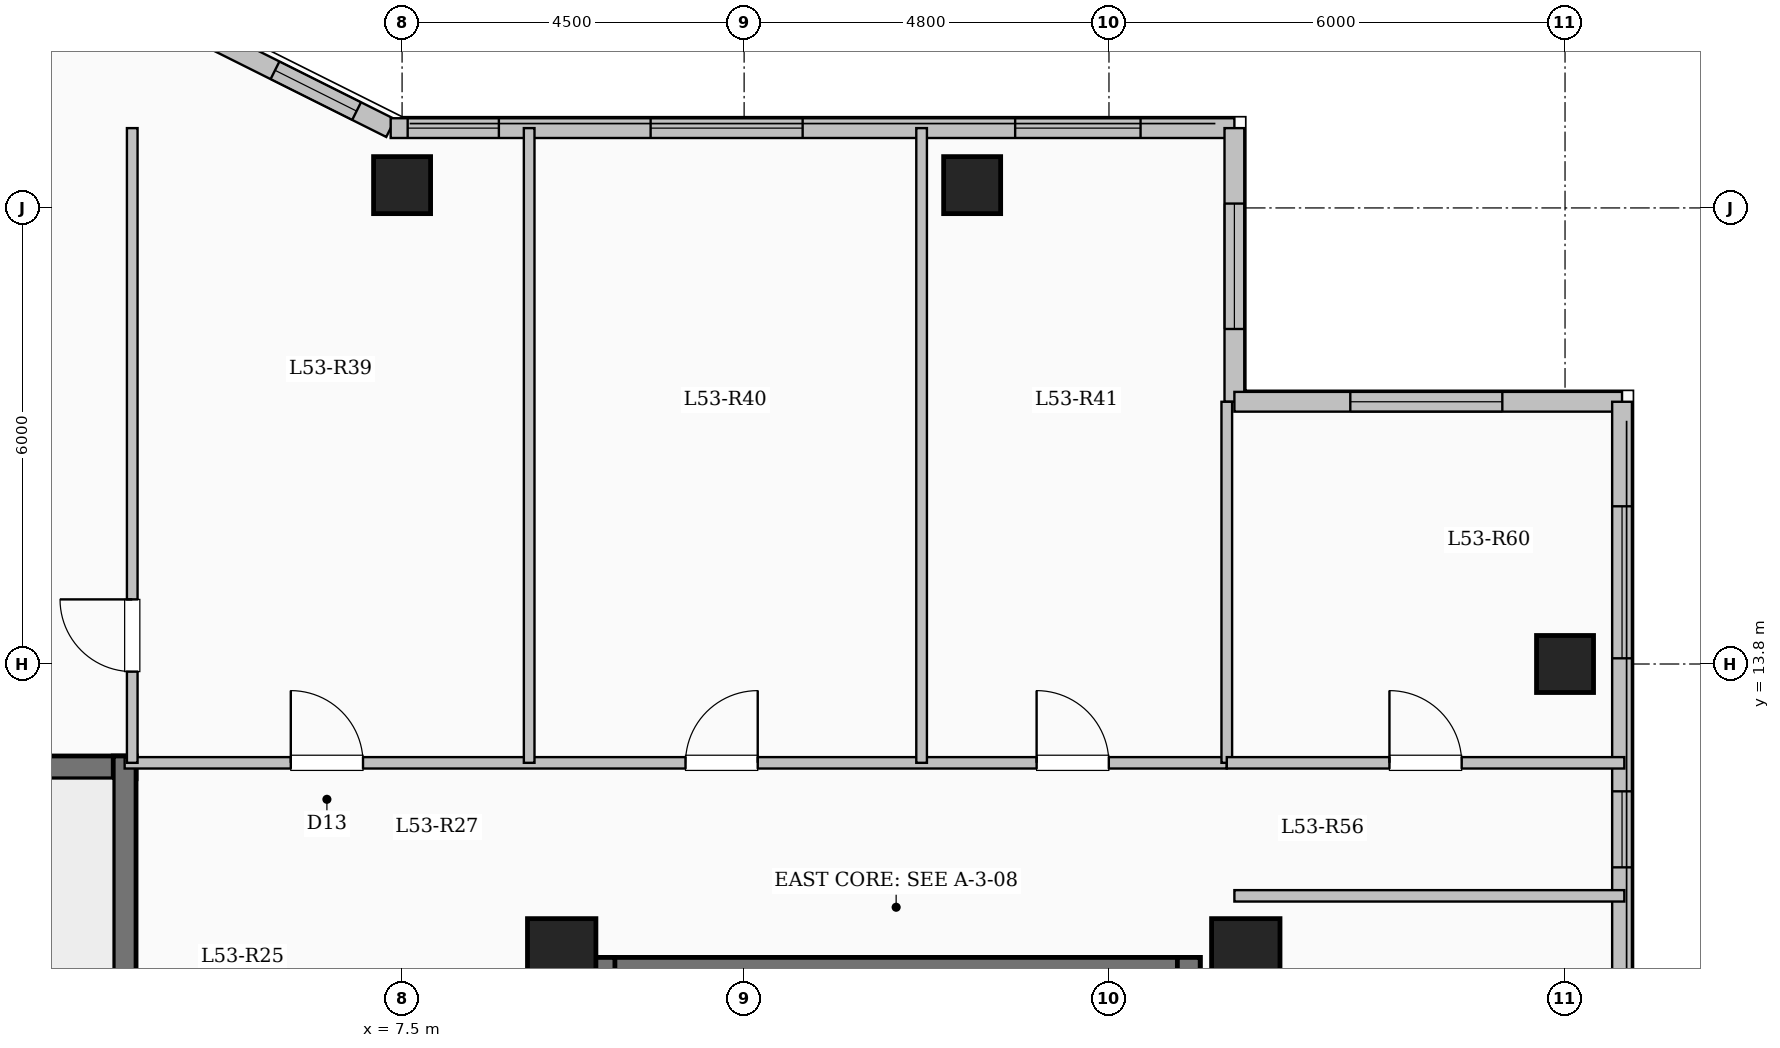
"""IFC4 building model, lengths in metres.
Left out: names, types, materials, properties, quantities, classifications, styles, units other than length and angle.
Written with IfcOpenShell. Run it as: python <this file> out.ifc"""

import sys

from ifc_helpers import new_model, si_unit, direction, frame, frame_2d, origin, origin_2d, place, context, subcontext, project, spatial, rectangle, extrude, element, fill, save


model = new_model("IFC4")
c1 = context("Model", 3, precision=1e-05, world=origin(), true_north=direction((0.0, 1.0)))
c2 = subcontext(c1, "Body", "Model", "MODEL_VIEW")
j1 = project(units=[si_unit("LENGTHUNIT", "METRE"), si_unit("PLANEANGLEUNIT", "RADIAN")], contexts=[c1])
p1 = place(None, origin())
s1 = spatial("IfcSite", under=j1, at=p1, CompositionType="ELEMENT")
p2 = place(p1, origin())
s2 = spatial("IfcBuilding", under=s1, at=p2, CompositionType="ELEMENT")
p3 = place(p2, frame((0.0, 0.0, 196.95)))
s3 = spatial("IfcBuildingStorey", under=s2, at=p3, CompositionType="ELEMENT", Elevation=196.95)
for number, where, z_axis, x_axis in (
    (1, (9.6, 10.0, 0.0), (0.0, 0.0, 1.0), (1.0, 0.0, 0.0)),
    (2, (18.6, 10.0, 0.0), (0.0, 0.0, 1.0), (1.0, 0.0, 0.0)),
):
    element("IfcColumn", number, at=place(p3, frame(where, z_axis=z_axis, x_axis=x_axis)), inside=s3, PredefinedType="COLUMN", context=c2, shape_type="SweptSolid", body=[
        extrude(rectangle(XDim=0.9, YDim=0.9, at=origin_2d()), origin(), (0.0, 0.0, 1.0), 3.35),
    ])
for number, where, z_axis, x_axis in (
    (3, (7.5, 20.1, 0.0), (0.0, 0.0, 1.0), (1.0, 0.0, 0.0)),
    (4, (15.0, 20.1, 0.0), (0.0, 0.0, 1.0), (1.0, 0.0, 0.0)),
    (5, (22.8, 13.8, 0.0), (0.0, 0.0, 1.0), (1.0, 0.0, 0.0)),
):
    element("IfcColumn", number, at=place(p3, frame(where, z_axis=z_axis, x_axis=x_axis)), inside=s3, PredefinedType="COLUMN", context=c2, shape_type="SweptSolid", body=[
        extrude(rectangle(XDim=0.75, YDim=0.75, at=origin_2d()), origin(), (0.0, 0.0, 1.0), 3.35),
    ])
p4 = place(p3, frame((4.35, 22.35, 0.0), z_axis=(0.0, 0.0, 1.0), x_axis=(0.894427191, -0.4472135955, 0.0)))
e6 = element("IfcWall", 6, at=p4, inside=s3, PredefinedType="SOLIDWALL", context=c2, shape_type="SweptSolid", body=[
    extrude(rectangle(XDim=3.354, YDim=0.26, at=frame_2d((1.677, 0.0))), origin(), (0.0, 0.0, 1.0), 3.1),
])
p5 = place(p4, frame((1.653, 0.0, 0.95)))
e7 = element("IfcOpeningElement", 7, at=p5, cuts=e6, PredefinedType="OPENING", context=c2, shape_type="SweptSolid", body=[
    extrude(rectangle(XDim=1.2, YDim=1.5, at=frame_2d((0.6, 0.75))), frame((0.0, 0.14, 0.0), z_axis=(0.0, -1.0, 0.0), x_axis=(1.0, 0.0, 0.0)), (0.0, 0.0, 1.0), 0.28),
])
p6 = place(p3, frame((7.35, 20.85, 0.0), z_axis=(0.0, 0.0, 1.0), x_axis=(1.0, 0.0, 0.0)))
e8 = element("IfcWall", 8, at=p6, inside=s3, PredefinedType="SOLIDWALL", context=c2, shape_type="SweptSolid", body=[
    extrude(rectangle(XDim=11.1, YDim=0.26, at=frame_2d((5.55, 0.0))), origin(), (0.0, 0.0, 1.0), 3.1),
])
p7 = place(p6, frame((0.223, 0.0, 0.95)))
e9 = element("IfcOpeningElement", 9, at=p7, cuts=e8, PredefinedType="OPENING", context=c2, shape_type="SweptSolid", body=[
    extrude(rectangle(XDim=1.2, YDim=1.5, at=frame_2d((0.6, 0.75))), frame((0.0, 0.14, 0.0), z_axis=(0.0, -1.0, 0.0), x_axis=(1.0, 0.0, 0.0)), (0.0, 0.0, 1.0), 0.28),
])
p8 = place(p6, frame((3.42, 0.0, 0.9)))
e10 = element("IfcOpeningElement", 10, at=p8, cuts=e8, PredefinedType="OPENING", context=c2, shape_type="SweptSolid", body=[
    extrude(rectangle(XDim=2.0, YDim=1.7, at=frame_2d((1.0, 0.85))), frame((0.0, 0.14, 0.0), z_axis=(0.0, -1.0, 0.0), x_axis=(1.0, 0.0, 0.0)), (0.0, 0.0, 1.0), 0.28),
])
p9 = place(p6, frame((8.216, 0.0, 0.9)))
e11 = element("IfcOpeningElement", 11, at=p9, cuts=e8, PredefinedType="OPENING", context=c2, shape_type="SweptSolid", body=[
    extrude(rectangle(XDim=1.65, YDim=1.6, at=frame_2d((0.825, 0.8))), frame((0.0, 0.14, 0.0), z_axis=(0.0, -1.0, 0.0), x_axis=(1.0, 0.0, 0.0)), (0.0, 0.0, 1.0), 0.28),
])
p10 = place(p3, frame((18.45, 20.85, 0.0), z_axis=(0.0, 0.0, 1.0), x_axis=(0.0, -1.0, 0.0)))
e12 = element("IfcWall", 12, at=p10, inside=s3, PredefinedType="SOLIDWALL", context=c2, shape_type="SweptSolid", body=[
    extrude(rectangle(XDim=3.6, YDim=0.26, at=frame_2d((1.8, 0.0))), origin(), (0.0, 0.0, 1.0), 3.1),
])
p11 = place(p10, frame((0.992, 0.0, 0.9)))
e13 = element("IfcOpeningElement", 13, at=p11, cuts=e12, PredefinedType="OPENING", context=c2, shape_type="SweptSolid", body=[
    extrude(rectangle(XDim=1.65, YDim=1.6, at=frame_2d((0.825, 0.8))), frame((0.0, 0.14, 0.0), z_axis=(0.0, -1.0, 0.0), x_axis=(1.0, 0.0, 0.0)), (0.0, 0.0, 1.0), 0.28),
])
p12 = place(p3, frame((18.45, 17.25, 0.0), z_axis=(0.0, 0.0, 1.0), x_axis=(1.0, 0.0, 0.0)))
e14 = element("IfcWall", 14, at=p12, inside=s3, PredefinedType="SOLIDWALL", context=c2, shape_type="SweptSolid", body=[
    extrude(rectangle(XDim=5.1, YDim=0.26, at=frame_2d((2.55, 0.0))), origin(), (0.0, 0.0, 1.0), 3.1),
])
p13 = place(p12, frame((1.525, 0.0, 0.9)))
e15 = element("IfcOpeningElement", 15, at=p13, cuts=e14, PredefinedType="OPENING", context=c2, shape_type="SweptSolid", body=[
    extrude(rectangle(XDim=2.0, YDim=1.7, at=frame_2d((1.0, 0.85))), frame((0.0, 0.14, 0.0), z_axis=(0.0, -1.0, 0.0), x_axis=(1.0, 0.0, 0.0)), (0.0, 0.0, 1.0), 0.28),
])
p14 = place(p3, frame((23.55, 17.25, 0.0), z_axis=(0.0, 0.0, 1.0), x_axis=(0.0, -1.0, 0.0)))
e16 = element("IfcWall", 16, at=p14, inside=s3, PredefinedType="SOLIDWALL", context=c2, shape_type="SweptSolid", body=[
    extrude(rectangle(XDim=34.5, YDim=0.26, at=frame_2d((17.25, 0.0))), origin(), (0.0, 0.0, 1.0), 3.1),
])
p15 = place(p14, frame((1.375, 0.0, 0.9)))
e17 = element("IfcOpeningElement", 17, at=p15, cuts=e16, PredefinedType="OPENING", context=c2, shape_type="SweptSolid", body=[
    extrude(rectangle(XDim=2.0, YDim=1.7, at=frame_2d((1.0, 0.85))), frame((0.0, 0.14, 0.0), z_axis=(0.0, -1.0, 0.0), x_axis=(1.0, 0.0, 0.0)), (0.0, 0.0, 1.0), 0.28),
])
p16 = place(p14, frame((5.125, 0.0, 0.95)))
e18 = element("IfcOpeningElement", 18, at=p16, cuts=e16, PredefinedType="OPENING", context=c2, shape_type="SweptSolid", body=[
    extrude(rectangle(XDim=1.0, YDim=1.5, at=frame_2d((0.5, 0.75))), frame((0.0, 0.14, 0.0), z_axis=(0.0, -1.0, 0.0), x_axis=(1.0, 0.0, 0.0)), (0.0, 0.0, 1.0), 0.28),
])
p17 = place(p14, frame((14.5, 0.0, 0.9)))
e19 = element("IfcOpeningElement", 19, at=p17, cuts=e16, PredefinedType="OPENING", context=c2, shape_type="SweptSolid", body=[
    extrude(rectangle(XDim=2.0, YDim=1.7, at=frame_2d((1.0, 0.85))), frame((0.0, 0.14, 0.0), z_axis=(0.0, -1.0, 0.0), x_axis=(1.0, 0.0, 0.0)), (0.0, 0.0, 1.0), 0.28),
])
p18 = place(p14, frame((24.975, 0.0, 0.95)))
e20 = element("IfcOpeningElement", 20, at=p18, cuts=e16, PredefinedType="OPENING", context=c2, shape_type="SweptSolid", body=[
    extrude(rectangle(XDim=1.2, YDim=1.5, at=frame_2d((0.6, 0.75))), frame((0.0, 0.14, 0.0), z_axis=(0.0, -1.0, 0.0), x_axis=(1.0, 0.0, 0.0)), (0.0, 0.0, 1.0), 0.28),
])
p19 = place(p14, frame((29.475, 0.0, 0.9)))
e21 = element("IfcOpeningElement", 21, at=p19, cuts=e16, PredefinedType="OPENING", context=c2, shape_type="SweptSolid", body=[
    extrude(rectangle(XDim=2.2, YDim=1.75, at=frame_2d((1.1, 0.875))), frame((0.0, 0.14, 0.0), z_axis=(0.0, -1.0, 0.0), x_axis=(1.0, 0.0, 0.0)), (0.0, 0.0, 1.0), 0.28),
])
p20 = place(p3, frame((10.0, 9.79, 0.0), z_axis=(0.0, 0.0, 1.0), x_axis=(1.0, 0.0, 0.0)))
e22 = element("IfcWall", 22, at=p20, inside=s3, PredefinedType="SHEAR", context=c2, shape_type="SweptSolid", body=[
    extrude(rectangle(XDim=8.0, YDim=0.3, at=frame_2d((4.0, 0.0))), origin(), (0.0, 0.0, 1.0), 3.35),
])
for number, where, z_axis, x_axis in (
    (23, (10.15, 6.35, 0.0), (0.0, 0.0, 1.0), (0.0, 1.0, 0.0)),
    (24, (17.85, 6.35, 0.0), (0.0, 0.0, 1.0), (0.0, 1.0, 0.0)),
):
    element("IfcWall", number, at=place(p3, frame(where, z_axis=z_axis, x_axis=x_axis)), inside=s3, PredefinedType="SHEAR", context=c2, shape_type="SweptSolid", body=[
        extrude(rectangle(XDim=3.59, YDim=0.3, at=frame_2d((1.795, 0.0))), origin(), (0.0, 0.0, 1.0), 3.35),
    ])
p21 = place(p3, frame((-4.0, 12.44, 0.0), z_axis=(0.0, 0.0, 1.0), x_axis=(1.0, 0.0, 0.0)))
e25 = element("IfcWall", 25, at=p21, inside=s3, PredefinedType="SHEAR", context=c2, shape_type="SweptSolid", body=[
    extrude(rectangle(XDim=8.0, YDim=0.3, at=frame_2d((4.0, 0.0))), origin(), (0.0, 0.0, 1.0), 3.35),
])
p22 = place(p3, frame((3.85, 9.0, 0.0), z_axis=(0.0, 0.0, 1.0), x_axis=(0.0, 1.0, 0.0)))
e26 = element("IfcWall", 26, at=p22, inside=s3, PredefinedType="SHEAR", context=c2, shape_type="SweptSolid", body=[
    extrude(rectangle(XDim=3.59, YDim=0.3, at=frame_2d((1.795, 0.0))), origin(), (0.0, 0.0, 1.0), 3.35),
])
p23 = place(p3, frame((3.85, 12.5, 0.0), z_axis=(0.0, 0.0, 1.0), x_axis=(1.0, 0.0, 0.0)))
e27 = element("IfcWall", 27, at=p23, inside=s3, PredefinedType="PARTITIONING", context=c2, shape_type="SweptSolid", body=[
    extrude(rectangle(XDim=14.5, YDim=0.15, at=frame_2d((7.25, 0.0))), origin(), (0.0, 0.0, 1.0), 3.1),
])
p24 = place(p23, frame((2.186, 0.0, 0.0)))
e28 = element("IfcOpeningElement", 28, at=p24, cuts=e27, PredefinedType="OPENING", context=c2, shape_type="SweptSolid", body=[
    extrude(rectangle(XDim=0.95, YDim=2.15, at=frame_2d((0.475, 1.075))), frame((0.0, 0.085, 0.0), z_axis=(0.0, -1.0, 0.0), x_axis=(1.0, 0.0, 0.0)), (0.0, 0.0, 1.0), 0.17),
])
p25 = place(p23, frame((7.379, 0.0, 0.0)))
e29 = element("IfcOpeningElement", 29, at=p25, cuts=e27, PredefinedType="OPENING", context=c2, shape_type="SweptSolid", body=[
    extrude(rectangle(XDim=0.95, YDim=2.15, at=frame_2d((0.475, 1.075))), frame((0.0, 0.085, 0.0), z_axis=(0.0, -1.0, 0.0), x_axis=(1.0, 0.0, 0.0)), (0.0, 0.0, 1.0), 0.17),
])
p26 = place(p23, frame((11.998, 0.0, 0.0)))
e30 = element("IfcOpeningElement", 30, at=p26, cuts=e27, PredefinedType="OPENING", context=c2, shape_type="SweptSolid", body=[
    extrude(rectangle(XDim=0.95, YDim=2.15, at=frame_2d((0.475, 1.075))), frame((0.0, 0.085, 0.0), z_axis=(0.0, -1.0, 0.0), x_axis=(1.0, 0.0, 0.0)), (0.0, 0.0, 1.0), 0.17),
])
p27 = place(p3, frame((3.95, 12.5, 0.0), z_axis=(0.0, 0.0, 1.0), x_axis=(0.0, 1.0, 0.0)))
e31 = element("IfcWall", 31, at=p27, inside=s3, PredefinedType="PARTITIONING", context=c2, shape_type="SweptSolid", body=[
    extrude(rectangle(XDim=8.35, YDim=0.14, at=frame_2d((4.175, 0.0))), origin(), (0.0, 0.0, 1.0), 3.1),
])
p28 = place(p27, frame((1.2, 0.0, 0.0)))
e32 = element("IfcOpeningElement", 32, at=p28, cuts=e31, PredefinedType="OPENING", context=c2, shape_type="SweptSolid", body=[
    extrude(rectangle(XDim=0.95, YDim=2.15, at=frame_2d((0.475, 1.075))), frame((0.0, 0.08, 0.0), z_axis=(0.0, -1.0, 0.0), x_axis=(1.0, 0.0, 0.0)), (0.0, 0.0, 1.0), 0.16),
])
for number, where, z_axis, x_axis in (
    (33, (9.172, 12.5, 0.0), (0.0, 0.0, 1.0), (0.0, 1.0, 0.0)),
    (34, (14.335, 12.5, 0.0), (0.0, 0.0, 1.0), (0.0, 1.0, 0.0)),
):
    element("IfcWall", number, at=place(p3, frame(where, z_axis=z_axis, x_axis=x_axis)), inside=s3, PredefinedType="PARTITIONING", context=c2, shape_type="SweptSolid", body=[
        extrude(rectangle(XDim=8.35, YDim=0.14, at=frame_2d((4.175, 0.0))), origin(), (0.0, 0.0, 1.0), 3.1),
    ])
p29 = place(p3, frame((18.45, 10.75, 0.0), z_axis=(0.0, 0.0, 1.0), x_axis=(1.0, 0.0, 0.0)))
e35 = element("IfcWall", 35, at=p29, inside=s3, PredefinedType="PARTITIONING", context=c2, shape_type="SweptSolid", body=[
    extrude(rectangle(XDim=5.13, YDim=0.15, at=frame_2d((2.565, 0.0))), origin(), (0.0, 0.0, 1.0), 3.1),
])
p30 = place(p3, frame((18.35, 12.5, 0.0), z_axis=(0.0, 0.0, 1.0), x_axis=(0.0, 1.0, 0.0)))
e36 = element("IfcWall", 36, at=p30, inside=s3, PredefinedType="PARTITIONING", context=c2, shape_type="SweptSolid", body=[
    extrude(rectangle(XDim=4.75, YDim=0.14, at=frame_2d((2.375, 0.0))), origin(), (0.0, 0.0, 1.0), 3.1),
])
p31 = place(p3, frame((18.35, 12.5, 0.0), z_axis=(0.0, 0.0, 1.0), x_axis=(1.0, 0.0, 0.0)))
e37 = element("IfcWall", 37, at=p31, inside=s3, PredefinedType="PARTITIONING", context=c2, shape_type="SweptSolid", body=[
    extrude(rectangle(XDim=5.23, YDim=0.15, at=frame_2d((2.615, 0.0))), origin(), (0.0, 0.0, 1.0), 3.1),
])
p32 = place(p31, frame((2.14, 0.0, 0.0)))
e38 = element("IfcOpeningElement", 38, at=p32, cuts=e37, PredefinedType="OPENING", context=c2, shape_type="SweptSolid", body=[
    extrude(rectangle(XDim=0.95, YDim=2.15, at=frame_2d((0.475, 1.075))), frame((0.0, 0.085, 0.0), z_axis=(0.0, -1.0, 0.0), x_axis=(1.0, 0.0, 0.0)), (0.0, 0.0, 1.0), 0.17),
])
p33 = place(p5, origin())
e39 = element("IfcWindow", 39, at=p33, inside=s3, PartitioningType="SINGLE_PANEL", PredefinedType="WINDOW", context=c2, shape_type="SweptSolid", body=[
    extrude(rectangle(XDim=1.2, YDim=1.5, at=frame_2d((0.6, 0.75))), frame((0.0, 0.03, 0.0), z_axis=(0.0, -1.0, 0.0), x_axis=(1.0, 0.0, 0.0)), (0.0, 0.0, 1.0), 0.06),
])
fill(e7, e39)
p34 = place(p7, origin())
e40 = element("IfcWindow", 40, at=p34, inside=s3, PartitioningType="SINGLE_PANEL", PredefinedType="WINDOW", context=c2, shape_type="SweptSolid", body=[
    extrude(rectangle(XDim=1.2, YDim=1.5, at=frame_2d((0.6, 0.75))), frame((0.0, 0.03, 0.0), z_axis=(0.0, -1.0, 0.0), x_axis=(1.0, 0.0, 0.0)), (0.0, 0.0, 1.0), 0.06),
])
fill(e9, e40)
p35 = place(p8, origin())
e41 = element("IfcWindow", 41, at=p35, inside=s3, PartitioningType="SINGLE_PANEL", PredefinedType="WINDOW", context=c2, shape_type="SweptSolid", body=[
    extrude(rectangle(XDim=2.0, YDim=1.7, at=frame_2d((1.0, 0.85))), frame((0.0, 0.03, 0.0), z_axis=(0.0, -1.0, 0.0), x_axis=(1.0, 0.0, 0.0)), (0.0, 0.0, 1.0), 0.06),
])
fill(e10, e41)
p36 = place(p9, origin())
e42 = element("IfcWindow", 42, at=p36, inside=s3, PartitioningType="SINGLE_PANEL", PredefinedType="WINDOW", context=c2, shape_type="SweptSolid", body=[
    extrude(rectangle(XDim=1.65, YDim=1.6, at=frame_2d((0.825, 0.8))), frame((0.0, 0.03, 0.0), z_axis=(0.0, -1.0, 0.0), x_axis=(1.0, 0.0, 0.0)), (0.0, 0.0, 1.0), 0.06),
])
fill(e11, e42)
p37 = place(p11, origin())
e43 = element("IfcWindow", 43, at=p37, inside=s3, PartitioningType="SINGLE_PANEL", PredefinedType="WINDOW", context=c2, shape_type="SweptSolid", body=[
    extrude(rectangle(XDim=1.65, YDim=1.6, at=frame_2d((0.825, 0.8))), frame((0.0, 0.03, 0.0), z_axis=(0.0, -1.0, 0.0), x_axis=(1.0, 0.0, 0.0)), (0.0, 0.0, 1.0), 0.06),
])
fill(e13, e43)
p38 = place(p13, origin())
e44 = element("IfcWindow", 44, at=p38, inside=s3, PartitioningType="SINGLE_PANEL", PredefinedType="WINDOW", context=c2, shape_type="SweptSolid", body=[
    extrude(rectangle(XDim=2.0, YDim=1.7, at=frame_2d((1.0, 0.85))), frame((0.0, 0.03, 0.0), z_axis=(0.0, -1.0, 0.0), x_axis=(1.0, 0.0, 0.0)), (0.0, 0.0, 1.0), 0.06),
])
fill(e15, e44)
p39 = place(p15, origin())
e45 = element("IfcWindow", 45, at=p39, inside=s3, PartitioningType="SINGLE_PANEL", PredefinedType="WINDOW", context=c2, shape_type="SweptSolid", body=[
    extrude(rectangle(XDim=2.0, YDim=1.7, at=frame_2d((1.0, 0.85))), frame((0.0, 0.03, 0.0), z_axis=(0.0, -1.0, 0.0), x_axis=(1.0, 0.0, 0.0)), (0.0, 0.0, 1.0), 0.06),
])
fill(e17, e45)
p40 = place(p16, origin())
e46 = element("IfcWindow", 46, at=p40, inside=s3, PartitioningType="SINGLE_PANEL", PredefinedType="WINDOW", context=c2, shape_type="SweptSolid", body=[
    extrude(rectangle(XDim=1.0, YDim=1.5, at=frame_2d((0.5, 0.75))), frame((0.0, 0.03, 0.0), z_axis=(0.0, -1.0, 0.0), x_axis=(1.0, 0.0, 0.0)), (0.0, 0.0, 1.0), 0.06),
])
fill(e18, e46)
p41 = place(p24, origin())
e47 = element("IfcDoor", 47, at=p41, inside=s3, OperationType="SINGLE_SWING_LEFT", PredefinedType="DOOR", context=c2, shape_type="SweptSolid", body=[
    extrude(rectangle(XDim=0.95, YDim=2.15, at=frame_2d((0.475, 1.075))), frame((0.0, 0.025, 0.0), z_axis=(0.0, -1.0, 0.0), x_axis=(1.0, 0.0, 0.0)), (0.0, 0.0, 1.0), 0.05),
])
fill(e28, e47)
p42 = place(p25, origin())
e48 = element("IfcDoor", 48, at=p42, inside=s3, OperationType="SINGLE_SWING_RIGHT", PredefinedType="DOOR", context=c2, shape_type="SweptSolid", body=[
    extrude(rectangle(XDim=0.95, YDim=2.15, at=frame_2d((0.475, 1.075))), frame((0.0, 0.025, 0.0), z_axis=(0.0, -1.0, 0.0), x_axis=(1.0, 0.0, 0.0)), (0.0, 0.0, 1.0), 0.05),
])
fill(e29, e48)
p43 = place(p26, origin())
e49 = element("IfcDoor", 49, at=p43, inside=s3, OperationType="SINGLE_SWING_LEFT", PredefinedType="DOOR", context=c2, shape_type="SweptSolid", body=[
    extrude(rectangle(XDim=0.95, YDim=2.15, at=frame_2d((0.475, 1.075))), frame((0.0, 0.025, 0.0), z_axis=(0.0, -1.0, 0.0), x_axis=(1.0, 0.0, 0.0)), (0.0, 0.0, 1.0), 0.05),
])
fill(e30, e49)
p44 = place(p28, origin())
e50 = element("IfcDoor", 50, at=p44, inside=s3, OperationType="SINGLE_SWING_RIGHT", PredefinedType="DOOR", context=c2, shape_type="SweptSolid", body=[
    extrude(rectangle(XDim=0.95, YDim=2.15, at=frame_2d((0.475, 1.075))), frame((0.0, 0.025, 0.0), z_axis=(0.0, -1.0, 0.0), x_axis=(1.0, 0.0, 0.0)), (0.0, 0.0, 1.0), 0.05),
])
fill(e32, e50)
p45 = place(p32, origin())
e51 = element("IfcDoor", 51, at=p45, inside=s3, OperationType="SINGLE_SWING_LEFT", PredefinedType="DOOR", context=c2, shape_type="SweptSolid", body=[
    extrude(rectangle(XDim=0.95, YDim=2.15, at=frame_2d((0.475, 1.075))), frame((0.0, 0.025, 0.0), z_axis=(0.0, -1.0, 0.0), x_axis=(1.0, 0.0, 0.0)), (0.0, 0.0, 1.0), 0.05),
])
fill(e38, e51)
save(model, sys.argv[1])
